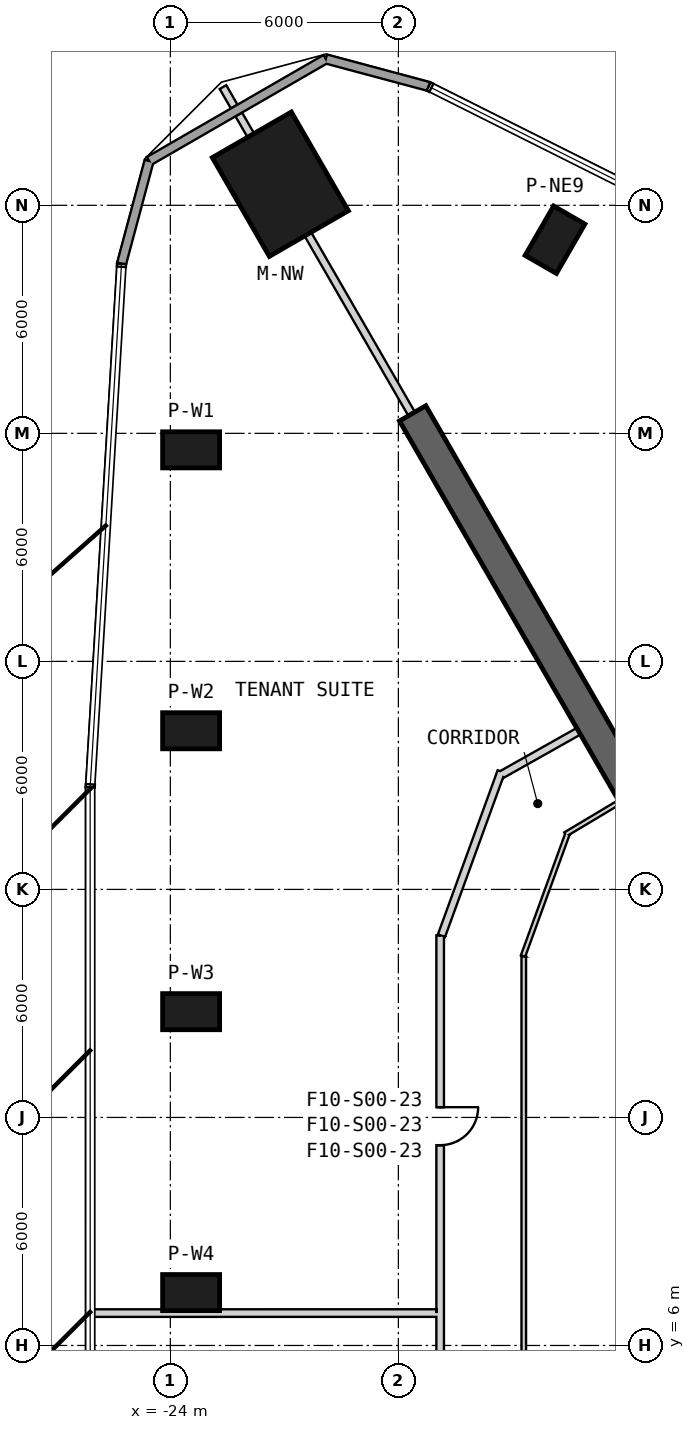
"""IFC4 building model, lengths in metres.
Left out: names, types, materials, properties, quantities, classifications, styles, units other than length and angle.
Written with IfcOpenShell. Run it as: python <this file> out.ifc"""

import sys

from ifc_helpers import new_model, si_unit, direction, frame, frame_2d, origin, origin_2d, place, context, subcontext, project, spatial, rectangle, extrude, element, fill, save


model = new_model("IFC4")
c1 = context("Model", 3, precision=1e-05, world=origin(), true_north=direction((0.0, 1.0)))
c2 = subcontext(c1, "Body", "Model", "MODEL_VIEW")
j1 = project(units=[si_unit("LENGTHUNIT", "METRE"), si_unit("PLANEANGLEUNIT", "RADIAN")], contexts=[c1])
p1 = place(None, origin())
s1 = spatial("IfcSite", under=j1, at=p1, CompositionType="ELEMENT")
p2 = place(p1, origin())
s2 = spatial("IfcBuilding", under=s1, at=p2, CompositionType="ELEMENT")
p3 = place(p2, frame((0.0, 0.0, 45.5)))
s3 = spatial("IfcBuildingStorey", under=s2, at=p3, CompositionType="ELEMENT", Elevation=45.5)
p4 = place(p3, frame((-21.106, 36.556, 0.0), z_axis=(0.0, 0.0, 1.0), x_axis=(-0.5, 0.866025403784, 0.0)))
e1 = element("IfcColumn", 1, at=p4, inside=s3, PredefinedType="COLUMN", context=c2, shape_type="SweptSolid", body=[
    extrude(rectangle(XDim=3.0, YDim=2.4, at=origin_2d()), origin(), (0.0, 0.0, 1.0), 4.1),
])
for number, where, z_axis, x_axis in (
    (2, (-23.453, 29.566, 0.0), (0.0, 0.0, 1.0), (-1.0, 0.0, 0.0)),
    (3, (-23.453, 22.174, 0.0), (0.0, 0.0, 1.0), (-1.0, 0.0, 0.0)),
    (4, (-23.453, 14.783, 0.0), (0.0, 0.0, 1.0), (-1.0, 0.0, 0.0)),
):
    element("IfcColumn", number, at=place(p3, frame(where, z_axis=z_axis, x_axis=x_axis)), inside=s3, PredefinedType="COLUMN", context=c2, shape_type="SweptSolid", body=[
        extrude(rectangle(XDim=1.5, YDim=0.95, at=origin_2d()), origin(), (0.0, 0.0, 1.0), 4.1),
    ])
p5 = place(p3, frame((-23.453, 7.391, -0.3), z_axis=(0.0, 0.0, 1.0), x_axis=(-1.0, 0.0, 0.0)))
e5 = element("IfcColumn", 5, at=p5, inside=s3, PredefinedType="COLUMN", context=c2, shape_type="SweptSolid", body=[
    extrude(rectangle(XDim=1.5, YDim=0.95, at=origin_2d()), origin(), (0.0, 0.0, 1.0), 4.4),
])
p6 = place(p3, frame((-13.878, 35.094, 0.0), z_axis=(0.0, 0.0, 1.0), x_axis=(0.5, 0.866025403784, 0.0)))
e6 = element("IfcColumn", 6, at=p6, inside=s3, PredefinedType="COLUMN", context=c2, shape_type="SweptSolid", body=[
    extrude(rectangle(XDim=1.5, YDim=0.95, at=origin_2d()), origin(), (0.0, 0.0, 1.0), 4.1),
])
p7 = place(p3, frame((-10.575, 18.316, 0.0), z_axis=(0.0, 0.0, 1.0), x_axis=(-0.499996272984, 0.866027555568, 0.0)))
e7 = element("IfcWall", 7, at=p7, inside=s3, PredefinedType="SHEAR", context=c2, shape_type="SweptSolid", body=[
    extrude(rectangle(XDim=14.098, YDim=0.8, at=frame_2d((7.049, 0.0))), origin(), (0.0, 0.0, 1.0), 4.1),
])
p8 = place(p7, frame((0.7, 0.0, 0.0)))
e8 = element("IfcOpeningElement", 8, at=p8, cuts=e7, PredefinedType="OPENING", context=c2, shape_type="SweptSolid", body=[
    extrude(rectangle(XDim=1.4, YDim=2.4, at=frame_2d((0.7, 1.2))), frame((0.0, 0.41, 0.0), z_axis=(0.0, -1.0, 0.0), x_axis=(1.0, 0.0, 0.0)), (0.0, 0.0, 1.0), 0.82),
])
p9 = place(p3, frame((-17.203, 39.128, 0.0), z_axis=(0.0, 0.0, 1.0), x_axis=(-0.965923146675, 0.25882904535, 0.0)))
e9 = element("IfcWall", 9, at=p9, inside=s3, PredefinedType="SOLIDWALL", context=c2, shape_type="SweptSolid", body=[
    extrude(rectangle(XDim=2.801, YDim=0.24, at=frame_2d((1.4, 0.0))), origin(), (0.0, 0.0, 1.0), 3.8),
])
p10 = place(p3, frame((-19.908, 39.853, 0.0), z_axis=(0.0, 0.0, 1.0), x_axis=(-0.866010734295, -0.500025407441, 0.0)))
e10 = element("IfcWall", 10, at=p10, inside=s3, PredefinedType="SOLIDWALL", context=c2, shape_type="SweptSolid", body=[
    extrude(rectangle(XDim=5.371, YDim=0.24, at=frame_2d((2.686, 0.0))), origin(), (0.0, 0.0, 1.0), 3.8),
])
p11 = place(p3, frame((-24.56, 37.167, 0.0), z_axis=(0.0, 0.0, 1.0), x_axis=(-0.258850842196, -0.965917305723, 0.0)))
e11 = element("IfcWall", 11, at=p11, inside=s3, PredefinedType="SOLIDWALL", context=c2, shape_type="SweptSolid", body=[
    extrude(rectangle(XDim=2.8, YDim=0.24, at=frame_2d((1.4, 0.0))), origin(), (0.0, 0.0, 1.0), 3.8),
])
p12 = place(p3, frame((-12.181, 20.299, 0.0), z_axis=(0.0, 0.0, 1.0), x_axis=(-0.8583241935, -0.51310776534, 0.0)))
e12 = element("IfcWall", 12, at=p12, inside=s3, PredefinedType="PARTITIONING", context=c2, shape_type="SweptSolid", body=[
    extrude(rectangle(XDim=1.656, YDim=0.12, at=frame_2d((0.828, 0.0))), origin(), (0.0, 0.0, 1.0), 3.8),
])
p13 = place(p3, frame((-13.549, 19.461, 0.0), z_axis=(0.0, 0.0, 1.0), x_axis=(-0.341989191955, -0.939703885586, 0.0)))
e13 = element("IfcWall", 13, at=p13, inside=s3, PredefinedType="PARTITIONING", context=c2, shape_type="SweptSolid", body=[
    extrude(rectangle(XDim=3.425, YDim=0.12, at=frame_2d((1.712, 0.0))), origin(), (0.0, 0.0, 1.0), 2.88),
])
p14 = place(p3, frame((-14.7, 16.24, 0.0), z_axis=(0.0, 0.0, 1.0), x_axis=(0.0, -1.0, 0.0)))
e14 = element("IfcWall", 14, at=p14, inside=s3, PredefinedType="PARTITIONING", context=c2, shape_type="SweptSolid", body=[
    extrude(rectangle(XDim=32.599, YDim=0.12, at=frame_2d((16.299, 0.0))), origin(), (0.0, 0.0, 1.0), 2.98),
])
p15 = place(p14, frame((15.77, 0.0, 0.0)))
e15 = element("IfcOpeningElement", 15, at=p15, cuts=e14, PredefinedType="OPENING", context=c2, shape_type="SweptSolid", body=[
    extrude(rectangle(XDim=1.0, YDim=2.1, at=frame_2d((0.5, 1.05))), frame((0.0, 0.07, 0.0), z_axis=(0.0, -1.0, 0.0), x_axis=(1.0, 0.0, 0.0)), (0.0, 0.0, 1.0), 0.14),
])
p16 = place(p3, frame((-16.9, 16.787, 0.0), z_axis=(0.0, 0.0, 1.0), x_axis=(0.0, -1.0, 0.0)))
e16 = element("IfcWall", 16, at=p16, inside=s3, PredefinedType="PARTITIONING", context=c2, shape_type="SweptSolid", body=[
    extrude(rectangle(XDim=33.375, YDim=0.2, at=frame_2d((16.688, 0.0))), origin(), (0.0, 0.0, 1.0), 2.98),
])
p17 = place(p16, frame((28.067, 0.0, 0.0)))
e17 = element("IfcOpeningElement", 17, at=p17, cuts=e16, PredefinedType="OPENING", context=c2, shape_type="SweptSolid", body=[
    extrude(rectangle(XDim=1.0, YDim=2.1, at=frame_2d((0.5, 1.05))), frame((0.0, 0.11, 0.0), z_axis=(0.0, -1.0, 0.0), x_axis=(1.0, 0.0, 0.0)), (0.0, 0.0, 1.0), 0.22),
])
p18 = place(p16, frame((16.347, 0.0, 0.0)))
e18 = element("IfcOpeningElement", 18, at=p18, cuts=e16, PredefinedType="OPENING", context=c2, shape_type="SweptSolid", body=[
    extrude(rectangle(XDim=1.0, YDim=2.1, at=frame_2d((0.5, 1.05))), frame((0.0, 0.11, 0.0), z_axis=(0.0, -1.0, 0.0), x_axis=(1.0, 0.0, 0.0)), (0.0, 0.0, 1.0), 0.22),
])
p19 = place(p16, frame((4.518, 0.0, 0.0)))
e19 = element("IfcOpeningElement", 19, at=p19, cuts=e16, PredefinedType="OPENING", context=c2, shape_type="SweptSolid", body=[
    extrude(rectangle(XDim=1.0, YDim=2.1, at=frame_2d((0.5, 1.05))), frame((0.0, 0.11, 0.0), z_axis=(0.0, -1.0, 0.0), x_axis=(1.0, 0.0, 0.0)), (0.0, 0.0, 1.0), 0.22),
])
p20 = place(p3, frame((-15.293, 21.102, 0.0), z_axis=(0.0, 0.0, 1.0), x_axis=(-0.341981820704, -0.939706568195, 0.0)))
e20 = element("IfcWall", 20, at=p20, inside=s3, PredefinedType="PARTITIONING", context=c2, shape_type="SweptSolid", body=[
    extrude(rectangle(XDim=4.597, YDim=0.2, at=frame_2d((2.299, 0.0))), origin(), (0.0, 0.0, 1.0), 2.88),
])
p21 = place(p3, frame((-13.257, 22.161, 0.0), z_axis=(0.0, 0.0, 1.0), x_axis=(-0.871385546515, -0.49059884766, 0.0)))
e21 = element("IfcWall", 21, at=p21, inside=s3, PredefinedType="PARTITIONING", context=c2, shape_type="SweptSolid", body=[
    extrude(rectangle(XDim=2.334, YDim=0.2, at=frame_2d((1.167, 0.0))), origin(), (0.0, 0.0, 1.0), 3.8),
])
p22 = place(p3, frame((-26.109, 6.852, 0.0), z_axis=(0.0, 0.0, 1.0), x_axis=(0.999999998563, 5.3604932e-05, 0.0)))
e22 = element("IfcWall", 22, at=p22, inside=s3, PredefinedType="PARTITIONING", context=c2, shape_type="SweptSolid", body=[
    extrude(rectangle(XDim=9.109, YDim=0.2, at=frame_2d((4.554, 0.0))), origin(), (0.0, 0.0, 1.0), 3.08),
])
p23 = place(p3, frame((-22.615, 39.111, 0.0), z_axis=(0.0, 0.0, 1.0), x_axis=(0.500222587251, -0.865896854829, 0.0)))
e23 = element("IfcWall", 23, at=p23, inside=s3, PredefinedType="PARTITIONING", context=c2, shape_type="SweptSolid", body=[
    extrude(rectangle(XDim=0.592, YDim=0.2, at=frame_2d((0.296, 0.0))), origin(), (0.0, 0.0, 1.0), 3.8),
])
p24 = place(p3, frame((-22.2, 38.391, 0.0), z_axis=(0.0, 0.0, 1.0), x_axis=(0.499977104415, -0.866038622153, 0.0)))
e24 = element("IfcWall", 24, at=p24, inside=s3, PredefinedType="PARTITIONING", context=c2, shape_type="SweptSolid", body=[
    extrude(rectangle(XDim=0.636, YDim=0.2, at=frame_2d((0.318, 0.0))), origin(), (0.0, 0.0, 1.0), 3.8),
])
p25 = place(p3, frame((-20.382, 35.242, 0.0), z_axis=(0.0, 0.0, 1.0), x_axis=(0.499984217882, -0.866034515403, 0.0)))
e25 = element("IfcWall", 25, at=p25, inside=s3, PredefinedType="PARTITIONING", context=c2, shape_type="SweptSolid", body=[
    extrude(rectangle(XDim=5.463, YDim=0.2, at=frame_2d((2.731, 0.0))), origin(), (0.0, 0.0, 1.0), 3.37),
])
p26 = place(p19, origin())
e26 = element("IfcDoor", 26, at=p26, inside=s3, OperationType="SINGLE_SWING_LEFT", PredefinedType="USERDEFINED", context=c2, shape_type="SweptSolid", body=[
    extrude(rectangle(XDim=1.0, YDim=2.1, at=frame_2d((0.5, 1.05))), frame((0.0, 0.025, 0.0), z_axis=(0.0, -1.0, 0.0), x_axis=(1.0, 0.0, 0.0)), (0.0, 0.0, 1.0), 0.05),
])
fill(e19, e26)
save(model, sys.argv[1])
